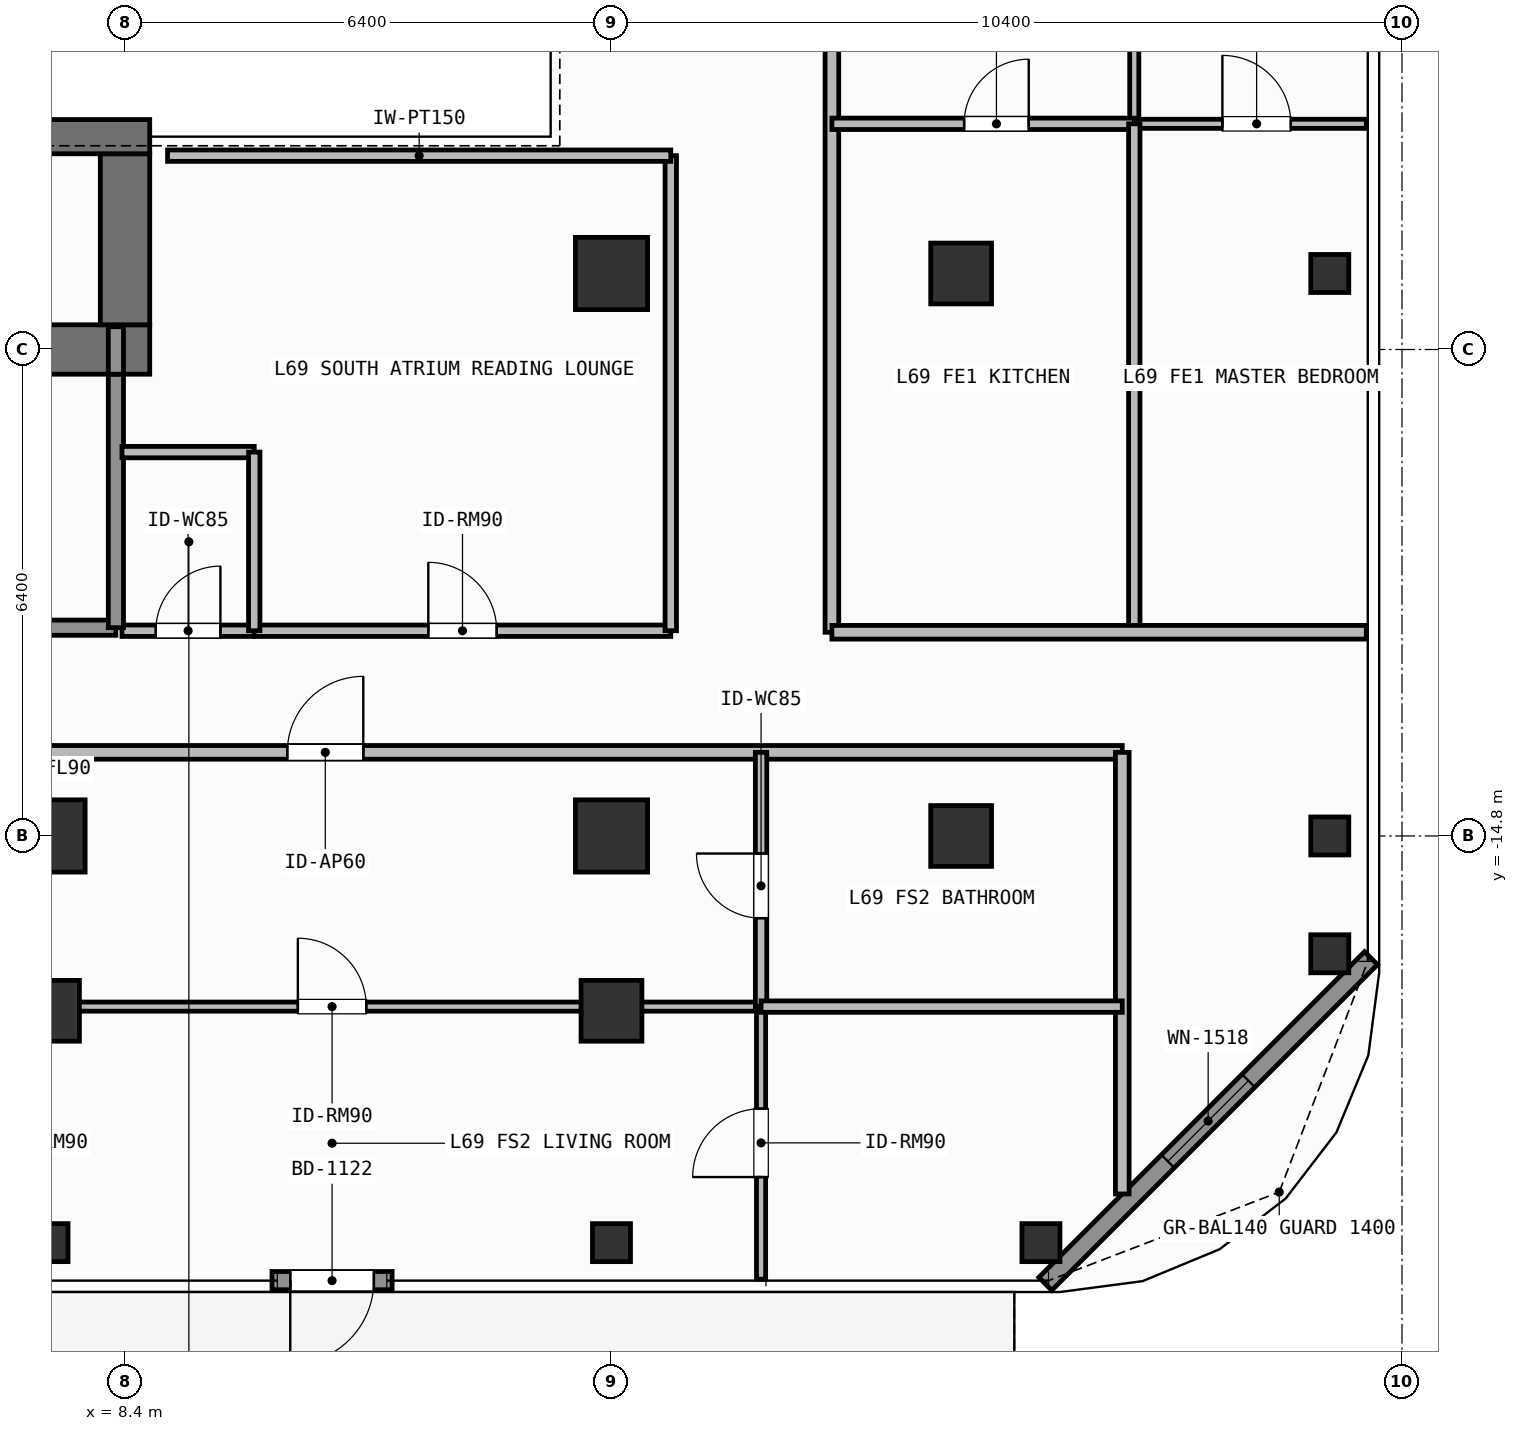
"""IFC4 building model, lengths in metres.
Left out: names, types, materials, properties, quantities, classifications, styles, units other than length and angle.
Written with IfcOpenShell. Run it as: python <this file> out.ifc"""

import sys

from ifc_helpers import new_model, si_unit, direction, frame, frame_2d, origin, origin_2d, place, context, subcontext, project, spatial, rectangle, hollow_rectangle, extrude, element, fill, save


model = new_model("IFC4")
c1 = context("Model", 3, precision=1e-05, world=origin(), true_north=direction((0.0, 1.0)))
c2 = subcontext(c1, "Body", "Model", "MODEL_VIEW")
j1 = project(units=[si_unit("LENGTHUNIT", "METRE"), si_unit("PLANEANGLEUNIT", "RADIAN")], contexts=[c1])
p1 = place(None, origin())
s1 = spatial("IfcSite", under=j1, at=p1, CompositionType="ELEMENT")
p2 = place(p1, origin())
s2 = spatial("IfcBuilding", under=s1, at=p2, CompositionType="ELEMENT")
p3 = place(p2, frame((0.0, 0.0, 282.0)))
s3 = spatial("IfcBuildingStorey", under=s2, at=p3, CompositionType="ELEMENT", Elevation=282.0)
p4 = place(p3, frame((6.12, -8.4, 0.0), z_axis=(0.0, 0.0, 1.0), x_axis=(1.0, 0.0, 0.0)))
e1 = element("IfcWall", 1, at=p4, inside=s3, PredefinedType="SHEAR", context=c2, shape_type="SweptSolid", body=[
    extrude(rectangle(XDim=2.605, YDim=0.65, at=frame_2d((1.302, 0.0))), origin(), (0.0, 0.0, 1.0), 3.9),
])
p5 = place(p3, frame((8.4, -8.075, 0.0), z_axis=(0.0, 0.0, 1.0), x_axis=(0.0, 1.0, 0.0)))
e2 = element("IfcWall", 2, at=p5, inside=s3, PredefinedType="SHEAR", context=c2, shape_type="SweptSolid", body=[
    extrude(rectangle(XDim=2.25, YDim=0.65, at=frame_2d((1.125, 0.0))), origin(), (0.0, 0.0, 1.0), 3.9),
])
p6 = place(p3, frame((3.045, -5.6, 0.0), z_axis=(0.0, 0.0, 1.0), x_axis=(1.0, 0.0, 0.0)))
e3 = element("IfcWall", 3, at=p6, inside=s3, PredefinedType="SHEAR", context=c2, shape_type="SweptSolid", body=[
    extrude(rectangle(XDim=5.68, YDim=0.45, at=frame_2d((2.84, 0.0))), origin(), (0.0, 0.0, 1.0), 3.9),
])
for number, where, z_axis, x_axis in (
    (4, (7.4, -14.8, 0.0), (0.0, 0.0, 1.0), (1.0, 0.0, 0.0)),
    (5, (14.8, -14.8, 0.0), (0.0, 0.0, 1.0), (1.0, 0.0, 0.0)),
    (6, (14.8, -7.4, 0.0), (0.0, 0.0, 1.0), (1.0, 0.0, 0.0)),
):
    element("IfcColumn", number, at=place(p3, frame(where, z_axis=z_axis, x_axis=x_axis)), inside=s3, PredefinedType="COLUMN", context=c2, shape_type="SweptSolid", body=[
        extrude(rectangle(XDim=0.95, YDim=0.95, at=origin_2d()), origin(), (0.0, 0.0, 1.0), 3.9),
    ])
for number, where, z_axis, x_axis in (
    (7, (19.4, -14.8, 0.0), (0.0, 0.0, 1.0), (1.0, 0.0, 0.0)),
    (8, (19.4, -7.4, 0.0), (0.0, 0.0, 1.0), (1.0, 0.0, 0.0)),
    (9, (7.4, -17.1, 0.0), (0.0, 0.0, 1.0), (1.0, 0.0, 0.0)),
    (10, (14.8, -17.1, 0.0), (0.0, 0.0, 1.0), (1.0, 0.0, 0.0)),
):
    element("IfcColumn", number, at=place(p3, frame(where, z_axis=z_axis, x_axis=x_axis)), inside=s3, PredefinedType="COLUMN", context=c2, shape_type="SweptSolid", body=[
        extrude(hollow_rectangle(XDim=0.8, YDim=0.8, WallThickness=0.036, at=origin_2d()), origin(), (0.0, 0.0, 1.0), 3.9),
    ])
for number, where, z_axis, x_axis in (
    (11, (20.45, -20.15, 0.0), (0.0, 0.0, 1.0), (1.0, 0.0, 0.0)),
    (12, (24.25, -16.35, 0.0), (0.0, 0.0, 1.0), (1.0, 0.0, 0.0)),
    (13, (7.4, -20.15, 0.0), (0.0, 0.0, 1.0), (1.0, 0.0, 0.0)),
    (14, (14.8, -20.15, 0.0), (0.0, 0.0, 1.0), (1.0, 0.0, 0.0)),
    (15, (24.25, -14.8, 0.0), (0.0, 0.0, 1.0), (1.0, 0.0, 0.0)),
    (16, (24.25, -7.4, 0.0), (0.0, 0.0, 1.0), (1.0, 0.0, 0.0)),
):
    element("IfcColumn", number, at=place(p3, frame(where, z_axis=z_axis, x_axis=x_axis)), inside=s3, PredefinedType="COLUMN", context=c2, shape_type="SweptSolid", body=[
        extrude(hollow_rectangle(XDim=0.5, YDim=0.5, WallThickness=0.025, at=origin_2d()), origin(), (0.0, 0.0, 1.0), 3.9),
    ])
p7 = place(p3, frame((11.914, -20.65, 0.0), z_axis=(0.0, 0.0, 1.0), x_axis=(-1.0, 0.0, 0.0)))
e17 = element("IfcWall", 17, at=p7, inside=s3, PredefinedType="SOLIDWALL", context=c2, shape_type="SweptSolid", body=[
    extrude(rectangle(XDim=1.58, YDim=0.24, at=frame_2d((0.79, 0.0))), origin(), (0.0, 0.0, 1.0), 3.62),
])
p8 = place(p7, frame((0.24, 0.0, 0.0)))
e18 = element("IfcOpeningElement", 18, at=p8, cuts=e17, PredefinedType="OPENING", context=c2, shape_type="SweptSolid", body=[
    extrude(rectangle(XDim=1.1, YDim=2.2, at=frame_2d((0.55, 1.1))), frame((0.0, 0.13, 0.0), z_axis=(0.0, -1.0, 0.0), x_axis=(1.0, 0.0, 0.0)), (0.0, 0.0, 1.0), 0.26),
])
p9 = place(p3, frame((24.792, -16.408, 0.0), z_axis=(0.0, 0.0, 1.0), x_axis=(-0.707126925818, -0.707086635981, 0.0)))
e19 = element("IfcWall", 19, at=p9, inside=s3, PredefinedType="SOLIDWALL", context=c2, shape_type="SweptSolid", body=[
    extrude(rectangle(XDim=6.06, YDim=0.24, at=frame_2d((3.03, 0.0))), origin(), (0.0, 0.0, 1.0), 3.62),
])
p10 = place(p9, frame((2.28, 0.0, 0.8)))
e20 = element("IfcOpeningElement", 20, at=p10, cuts=e19, PredefinedType="OPENING", context=c2, shape_type="SweptSolid", body=[
    extrude(rectangle(XDim=1.5, YDim=1.85, at=frame_2d((0.75, 0.925))), frame((0.0, 0.13, 0.0), z_axis=(0.0, -1.0, 0.0), x_axis=(1.0, 0.0, 0.0)), (0.0, 0.0, 1.0), 0.26),
])
p11 = place(p3, frame((4.58, -12.06, 0.0), z_axis=(0.0, 0.0, 1.0), x_axis=(1.0, 0.0, 0.0)))
e21 = element("IfcWall", 21, at=p11, inside=s3, PredefinedType="SOLIDWALL", context=c2, shape_type="SweptSolid", body=[
    extrude(rectangle(XDim=3.7, YDim=0.2, at=frame_2d((1.85, 0.0))), origin(), (0.0, 0.0, 1.0), 3.62),
])
p12 = place(p11, frame((1.212, 0.0, 0.0)))
e22 = element("IfcOpeningElement", 22, at=p12, cuts=e21, PredefinedType="OPENING", context=c2, shape_type="SweptSolid", body=[
    extrude(rectangle(XDim=1.1, YDim=2.15, at=frame_2d((0.55, 1.075))), frame((0.0, 0.11, 0.0), z_axis=(0.0, -1.0, 0.0), x_axis=(1.0, 0.0, 0.0)), (0.0, 0.0, 1.0), 0.22),
])
p13 = place(p3, frame((8.36, -12.1, 0.0), z_axis=(0.0, 0.0, 1.0), x_axis=(1.0, 0.0, 0.0)))
e23 = element("IfcWall", 23, at=p13, inside=s3, PredefinedType="PARTITIONING", context=c2, shape_type="SweptSolid", body=[
    extrude(rectangle(XDim=1.74, YDim=0.15, at=frame_2d((0.87, 0.0))), origin(), (0.0, 0.0, 1.0), 3.62),
])
p14 = place(p13, frame((0.445, 0.0, 0.0)))
e24 = element("IfcOpeningElement", 24, at=p14, cuts=e23, PredefinedType="OPENING", context=c2, shape_type="SweptSolid", body=[
    extrude(rectangle(XDim=0.85, YDim=2.1, at=frame_2d((0.425, 1.05))), frame((0.0, 0.085, 0.0), z_axis=(0.0, -1.0, 0.0), x_axis=(1.0, 0.0, 0.0)), (0.0, 0.0, 1.0), 0.17),
])
p15 = place(p3, frame((10.1, -12.1, 0.0), z_axis=(0.0, 0.0, 1.0), x_axis=(1.0, 0.0, 0.0)))
e25 = element("IfcWall", 25, at=p15, inside=s3, PredefinedType="PARTITIONING", context=c2, shape_type="SweptSolid", body=[
    extrude(rectangle(XDim=5.48, YDim=0.15, at=frame_2d((2.74, 0.0))), origin(), (0.0, 0.0, 1.0), 3.62),
])
p16 = place(p15, frame((2.29, 0.0, 0.0)))
e26 = element("IfcOpeningElement", 26, at=p16, cuts=e25, PredefinedType="OPENING", context=c2, shape_type="SweptSolid", body=[
    extrude(rectangle(XDim=0.9, YDim=2.1, at=frame_2d((0.45, 1.05))), frame((0.0, 0.085, 0.0), z_axis=(0.0, -1.0, 0.0), x_axis=(1.0, 0.0, 0.0)), (0.0, 0.0, 1.0), 0.17),
])
p17 = place(p3, frame((0.728, -13.7, 0.0), z_axis=(0.0, 0.0, 1.0), x_axis=(1.0, 0.0, 0.0)))
e27 = element("IfcWall", 27, at=p17, inside=s3, PredefinedType="PARTITIONING", context=c2, shape_type="SweptSolid", body=[
    extrude(rectangle(XDim=20.792, YDim=0.18, at=frame_2d((10.396, 0.0))), origin(), (0.0, 0.0, 1.0), 3.62),
])
p18 = place(p17, frame((9.807, 0.0, 0.0)))
e28 = element("IfcOpeningElement", 28, at=p18, cuts=e27, PredefinedType="OPENING", context=c2, shape_type="SweptSolid", body=[
    extrude(rectangle(XDim=1.0, YDim=2.2, at=frame_2d((0.5, 1.1))), frame((0.0, 0.1, 0.0), z_axis=(0.0, -1.0, 0.0), x_axis=(1.0, 0.0, 0.0)), (0.0, 0.0, 1.0), 0.2),
])
p19 = place(p3, frame((5.48, -17.045, 0.0), z_axis=(0.0, 0.0, 1.0), x_axis=(1.0, 0.0, 0.0)))
e29 = element("IfcWall", 29, at=p19, inside=s3, PredefinedType="PARTITIONING", context=c2, shape_type="SweptSolid", body=[
    extrude(rectangle(XDim=11.288, YDim=0.12, at=frame_2d((5.644, 0.0))), origin(), (0.0, 0.0, 1.0), 2.71),
])
p20 = place(p19, frame((5.194, 0.0, 0.0)))
e30 = element("IfcOpeningElement", 30, at=p20, cuts=e29, PredefinedType="OPENING", context=c2, shape_type="SweptSolid", body=[
    extrude(rectangle(XDim=0.9, YDim=2.1, at=frame_2d((0.45, 1.05))), frame((0.0, 0.07, 0.0), z_axis=(0.0, -1.0, 0.0), x_axis=(1.0, 0.0, 0.0)), (0.0, 0.0, 1.0), 0.14),
])
p21 = place(p3, frame((16.768, -17.045, 0.0), z_axis=(0.0, 0.0, 1.0), x_axis=(0.0, 1.0, 0.0)))
e31 = element("IfcWall", 31, at=p21, inside=s3, PredefinedType="PARTITIONING", context=c2, shape_type="SweptSolid", body=[
    extrude(rectangle(XDim=3.345, YDim=0.15, at=frame_2d((1.672, 0.0))), origin(), (0.0, 0.0, 1.0), 3.62),
])
p22 = place(p21, frame((1.164, 0.0, 0.0)))
e32 = element("IfcOpeningElement", 32, at=p22, cuts=e31, PredefinedType="OPENING", context=c2, shape_type="SweptSolid", body=[
    extrude(rectangle(XDim=0.85, YDim=2.1, at=frame_2d((0.425, 1.05))), frame((0.0, 0.085, 0.0), z_axis=(0.0, -1.0, 0.0), x_axis=(1.0, 0.0, 0.0)), (0.0, 0.0, 1.0), 0.17),
])
p23 = place(p3, frame((16.768, -20.63, 0.0), z_axis=(0.0, 0.0, 1.0), x_axis=(0.0, 1.0, 0.0)))
e33 = element("IfcWall", 33, at=p23, inside=s3, PredefinedType="PARTITIONING", context=c2, shape_type="SweptSolid", body=[
    extrude(rectangle(XDim=3.585, YDim=0.12, at=frame_2d((1.792, 0.0))), origin(), (0.0, 0.0, 1.0), 3.62),
])
p24 = place(p23, frame((1.343, 0.0, 0.0)))
e34 = element("IfcOpeningElement", 34, at=p24, cuts=e33, PredefinedType="OPENING", context=c2, shape_type="SweptSolid", body=[
    extrude(rectangle(XDim=0.9, YDim=2.1, at=frame_2d((0.45, 1.05))), frame((0.0, 0.07, 0.0), z_axis=(0.0, -1.0, 0.0), x_axis=(1.0, 0.0, 0.0)), (0.0, 0.0, 1.0), 0.14),
])
p25 = place(p3, frame((17.7, -12.12, 0.0), z_axis=(0.0, 0.0, 1.0), x_axis=(0.0, 1.0, 0.0)))
e35 = element("IfcWall", 35, at=p25, inside=s3, PredefinedType="PARTITIONING", context=c2, shape_type="SweptSolid", body=[
    extrude(rectangle(XDim=24.24, YDim=0.18, at=frame_2d((12.12, 0.0))), origin(), (0.0, 0.0, 1.0), 3.62),
])
p26 = place(p25, frame((11.62, 0.0, 0.0)))
e36 = element("IfcOpeningElement", 36, at=p26, cuts=e35, PredefinedType="OPENING", context=c2, shape_type="SweptSolid", body=[
    extrude(rectangle(XDim=1.0, YDim=2.2, at=frame_2d((0.5, 1.1))), frame((0.0, 0.1, 0.0), z_axis=(0.0, -1.0, 0.0), x_axis=(1.0, 0.0, 0.0)), (0.0, 0.0, 1.0), 0.2),
])
p27 = place(p3, frame((21.678, -5.431, 0.0), z_axis=(0.0, 0.0, 1.0), x_axis=(0.0, 1.0, 0.0)))
e37 = element("IfcWall", 37, at=p27, inside=s3, PredefinedType="PARTITIONING", context=c2, shape_type="SweptSolid", body=[
    extrude(rectangle(XDim=10.862, YDim=0.12, at=frame_2d((5.431, 0.0))), origin(), (0.0, 0.0, 1.0), 3.62),
])
p28 = place(p27, frame((4.981, 0.0, 0.0)))
e38 = element("IfcOpeningElement", 38, at=p28, cuts=e37, PredefinedType="OPENING", context=c2, shape_type="SweptSolid", body=[
    extrude(rectangle(XDim=0.9, YDim=2.1, at=frame_2d((0.45, 1.05))), frame((0.0, 0.07, 0.0), z_axis=(0.0, -1.0, 0.0), x_axis=(1.0, 0.0, 0.0)), (0.0, 0.0, 1.0), 0.14),
])
p29 = place(p3, frame((17.7, -5.431, 0.0), z_axis=(0.0, 0.0, 1.0), x_axis=(1.0, 0.0, 0.0)))
e39 = element("IfcWall", 39, at=p29, inside=s3, PredefinedType="PARTITIONING", context=c2, shape_type="SweptSolid", body=[
    extrude(rectangle(XDim=3.978, YDim=0.15, at=frame_2d((1.989, 0.0))), origin(), (0.0, 0.0, 1.0), 3.62),
])
p30 = place(p29, frame((1.74, 0.0, 0.0)))
e40 = element("IfcOpeningElement", 40, at=p30, cuts=e39, PredefinedType="OPENING", context=c2, shape_type="SweptSolid", body=[
    extrude(rectangle(XDim=0.85, YDim=2.1, at=frame_2d((0.425, 1.05))), frame((0.0, 0.085, 0.0), z_axis=(0.0, -1.0, 0.0), x_axis=(1.0, 0.0, 0.0)), (0.0, 0.0, 1.0), 0.17),
])
p31 = place(p3, frame((21.678, -5.431, 0.0), z_axis=(0.0, 0.0, 1.0), x_axis=(1.0, 0.0, 0.0)))
e41 = element("IfcWall", 41, at=p31, inside=s3, PredefinedType="PARTITIONING", context=c2, shape_type="SweptSolid", body=[
    extrude(rectangle(XDim=3.052, YDim=0.12, at=frame_2d((1.526, 0.0))), origin(), (0.0, 0.0, 1.0), 3.62),
])
p32 = place(p31, frame((1.159, 0.0, 0.0)))
e42 = element("IfcOpeningElement", 42, at=p32, cuts=e41, PredefinedType="OPENING", context=c2, shape_type="SweptSolid", body=[
    extrude(rectangle(XDim=0.9, YDim=2.1, at=frame_2d((0.45, 1.05))), frame((0.0, 0.07, 0.0), z_axis=(0.0, -1.0, 0.0), x_axis=(1.0, 0.0, 0.0)), (0.0, 0.0, 1.0), 0.14),
])
p33 = place(p3, frame((8.28, -12.06, 0.0), z_axis=(0.0, 0.0, 1.0), x_axis=(0.0, 1.0, 0.0)))
e43 = element("IfcWall", 43, at=p33, inside=s3, PredefinedType="SOLIDWALL", context=c2, shape_type="SweptSolid", body=[
    extrude(rectangle(XDim=3.335, YDim=0.2, at=frame_2d((1.667, 0.0))), origin(), (0.0, 0.0, 1.0), 3.62),
])
p34 = place(p3, frame((8.28, -8.725, 0.0), z_axis=(0.0, 0.0, 1.0), x_axis=(0.0, 1.0, 0.0)))
e44 = element("IfcWall", 44, at=p34, inside=s3, PredefinedType="SOLIDWALL", context=c2, shape_type="SweptSolid", body=[
    extrude(rectangle(XDim=0.625, YDim=0.2, at=frame_2d((0.312, 0.0))), origin(), (0.0, 0.0, 1.0), 3.62),
])
p35 = place(p3, frame((8.36, -9.75, 0.0), z_axis=(0.0, 0.0, 1.0), x_axis=(1.0, 0.0, 0.0)))
e45 = element("IfcWall", 45, at=p35, inside=s3, PredefinedType="PARTITIONING", context=c2, shape_type="SweptSolid", body=[
    extrude(rectangle(XDim=1.74, YDim=0.15, at=frame_2d((0.87, 0.0))), origin(), (0.0, 0.0, 1.0), 3.62),
])
p36 = place(p3, frame((10.1, -12.1, 0.0), z_axis=(0.0, 0.0, 1.0), x_axis=(0.0, 1.0, 0.0)))
e46 = element("IfcWall", 46, at=p36, inside=s3, PredefinedType="PARTITIONING", context=c2, shape_type="SweptSolid", body=[
    extrude(rectangle(XDim=2.35, YDim=0.15, at=frame_2d((1.175, 0.0))), origin(), (0.0, 0.0, 1.0), 3.62),
])
p37 = place(p3, frame((15.58, -12.1, 0.0), z_axis=(0.0, 0.0, 1.0), x_axis=(0.0, 1.0, 0.0)))
e47 = element("IfcWall", 47, at=p37, inside=s3, PredefinedType="PARTITIONING", context=c2, shape_type="SweptSolid", body=[
    extrude(rectangle(XDim=6.25, YDim=0.15, at=frame_2d((3.125, 0.0))), origin(), (0.0, 0.0, 1.0), 3.62),
])
p38 = place(p3, frame((8.96, -5.85, 0.0), z_axis=(0.0, 0.0, 1.0), x_axis=(1.0, 0.0, 0.0)))
e48 = element("IfcWall", 48, at=p38, inside=s3, PredefinedType="PARTITIONING", context=c2, shape_type="SweptSolid", body=[
    extrude(rectangle(XDim=6.62, YDim=0.15, at=frame_2d((3.31, 0.0))), origin(), (0.0, 0.0, 1.0), 3.62),
])
p39 = place(p3, frame((21.52, -19.51, 0.0), z_axis=(0.0, 0.0, 1.0), x_axis=(0.0, 1.0, 0.0)))
e49 = element("IfcWall", 49, at=p39, inside=s3, PredefinedType="PARTITIONING", context=c2, shape_type="SweptSolid", body=[
    extrude(rectangle(XDim=5.81, YDim=0.18, at=frame_2d((2.905, 0.0))), origin(), (0.0, 0.0, 1.0), 3.62),
])
p40 = place(p3, frame((16.768, -17.045, 0.0), z_axis=(0.0, 0.0, 1.0), x_axis=(1.0, 0.0, 0.0)))
e50 = element("IfcWall", 50, at=p40, inside=s3, PredefinedType="PARTITIONING", context=c2, shape_type="SweptSolid", body=[
    extrude(rectangle(XDim=4.752, YDim=0.15, at=frame_2d((2.376, 0.0))), origin(), (0.0, 0.0, 1.0), 3.62),
])
p41 = place(p3, frame((21.678, -12.12, 0.0), z_axis=(0.0, 0.0, 1.0), x_axis=(0.0, 1.0, 0.0)))
e51 = element("IfcWall", 51, at=p41, inside=s3, PredefinedType="PARTITIONING", context=c2, shape_type="SweptSolid", body=[
    extrude(rectangle(XDim=6.689, YDim=0.15, at=frame_2d((3.345, 0.0))), origin(), (0.0, 0.0, 1.0), 3.62),
])
p42 = place(p3, frame((17.7, -12.12, 0.0), z_axis=(0.0, 0.0, 1.0), x_axis=(1.0, 0.0, 0.0)))
e52 = element("IfcWall", 52, at=p42, inside=s3, PredefinedType="PARTITIONING", context=c2, shape_type="SweptSolid", body=[
    extrude(rectangle(XDim=7.03, YDim=0.18, at=frame_2d((3.515, 0.0))), origin(), (0.0, 0.0, 1.0), 3.62),
])
p43 = place(p8, origin())
e53 = element("IfcDoor", 53, at=p43, inside=s3, OperationType="SINGLE_SWING_RIGHT", PredefinedType="DOOR", context=c2, shape_type="SweptSolid", body=[
    extrude(rectangle(XDim=1.1, YDim=2.2, at=frame_2d((0.55, 1.1))), frame((0.0, 0.025, 0.0), z_axis=(0.0, -1.0, 0.0), x_axis=(1.0, 0.0, 0.0)), (0.0, 0.0, 1.0), 0.05),
])
fill(e18, e53)
p44 = place(p10, origin())
e54 = element("IfcWindow", 54, at=p44, inside=s3, PartitioningType="SINGLE_PANEL", PredefinedType="WINDOW", context=c2, shape_type="SweptSolid", body=[
    extrude(rectangle(XDim=1.5, YDim=1.85, at=frame_2d((0.75, 0.925))), frame((0.0, 0.03, 0.0), z_axis=(0.0, -1.0, 0.0), x_axis=(1.0, 0.0, 0.0)), (0.0, 0.0, 1.0), 0.06),
])
fill(e20, e54)
p45 = place(p14, origin())
e55 = element("IfcDoor", 55, at=p45, inside=s3, OperationType="SINGLE_SWING_RIGHT", PredefinedType="DOOR", context=c2, shape_type="SweptSolid", body=[
    extrude(rectangle(XDim=0.85, YDim=2.1, at=frame_2d((0.425, 1.05))), frame((0.0, 0.025, 0.0), z_axis=(0.0, -1.0, 0.0), x_axis=(1.0, 0.0, 0.0)), (0.0, 0.0, 1.0), 0.05),
])
fill(e24, e55)
p46 = place(p16, origin())
e56 = element("IfcDoor", 56, at=p46, inside=s3, OperationType="SINGLE_SWING_LEFT", PredefinedType="DOOR", context=c2, shape_type="SweptSolid", body=[
    extrude(rectangle(XDim=0.9, YDim=2.1, at=frame_2d((0.45, 1.05))), frame((0.0, 0.025, 0.0), z_axis=(0.0, -1.0, 0.0), x_axis=(1.0, 0.0, 0.0)), (0.0, 0.0, 1.0), 0.05),
])
fill(e26, e56)
p47 = place(p18, origin())
e57 = element("IfcDoor", 57, at=p47, inside=s3, OperationType="SINGLE_SWING_RIGHT", PredefinedType="DOOR", context=c2, shape_type="SweptSolid", body=[
    extrude(rectangle(XDim=1.0, YDim=2.2, at=frame_2d((0.5, 1.1))), frame((0.0, 0.025, 0.0), z_axis=(0.0, -1.0, 0.0), x_axis=(1.0, 0.0, 0.0)), (0.0, 0.0, 1.0), 0.05),
])
fill(e28, e57)
p48 = place(p20, origin())
e58 = element("IfcDoor", 58, at=p48, inside=s3, OperationType="SINGLE_SWING_LEFT", PredefinedType="DOOR", context=c2, shape_type="SweptSolid", body=[
    extrude(rectangle(XDim=0.9, YDim=2.1, at=frame_2d((0.45, 1.05))), frame((0.0, 0.025, 0.0), z_axis=(0.0, -1.0, 0.0), x_axis=(1.0, 0.0, 0.0)), (0.0, 0.0, 1.0), 0.05),
])
fill(e30, e58)
p49 = place(p22, origin())
e59 = element("IfcDoor", 59, at=p49, inside=s3, OperationType="SINGLE_SWING_RIGHT", PredefinedType="DOOR", context=c2, shape_type="SweptSolid", body=[
    extrude(rectangle(XDim=0.85, YDim=2.1, at=frame_2d((0.425, 1.05))), frame((0.0, 0.025, 0.0), z_axis=(0.0, -1.0, 0.0), x_axis=(1.0, 0.0, 0.0)), (0.0, 0.0, 1.0), 0.05),
])
fill(e32, e59)
p50 = place(p24, origin())
e60 = element("IfcDoor", 60, at=p50, inside=s3, OperationType="SINGLE_SWING_LEFT", PredefinedType="DOOR", context=c2, shape_type="SweptSolid", body=[
    extrude(rectangle(XDim=0.9, YDim=2.1, at=frame_2d((0.45, 1.05))), frame((0.0, 0.025, 0.0), z_axis=(0.0, -1.0, 0.0), x_axis=(1.0, 0.0, 0.0)), (0.0, 0.0, 1.0), 0.05),
])
fill(e34, e60)
p51 = place(p30, origin())
e61 = element("IfcDoor", 61, at=p51, inside=s3, OperationType="SINGLE_SWING_RIGHT", PredefinedType="DOOR", context=c2, shape_type="SweptSolid", body=[
    extrude(rectangle(XDim=0.85, YDim=2.1, at=frame_2d((0.425, 1.05))), frame((0.0, 0.025, 0.0), z_axis=(0.0, -1.0, 0.0), x_axis=(1.0, 0.0, 0.0)), (0.0, 0.0, 1.0), 0.05),
])
fill(e40, e61)
p52 = place(p32, origin())
e62 = element("IfcDoor", 62, at=p52, inside=s3, OperationType="SINGLE_SWING_LEFT", PredefinedType="DOOR", context=c2, shape_type="SweptSolid", body=[
    extrude(rectangle(XDim=0.9, YDim=2.1, at=frame_2d((0.45, 1.05))), frame((0.0, 0.025, 0.0), z_axis=(0.0, -1.0, 0.0), x_axis=(1.0, 0.0, 0.0)), (0.0, 0.0, 1.0), 0.05),
])
fill(e42, e62)
save(model, sys.argv[1])
